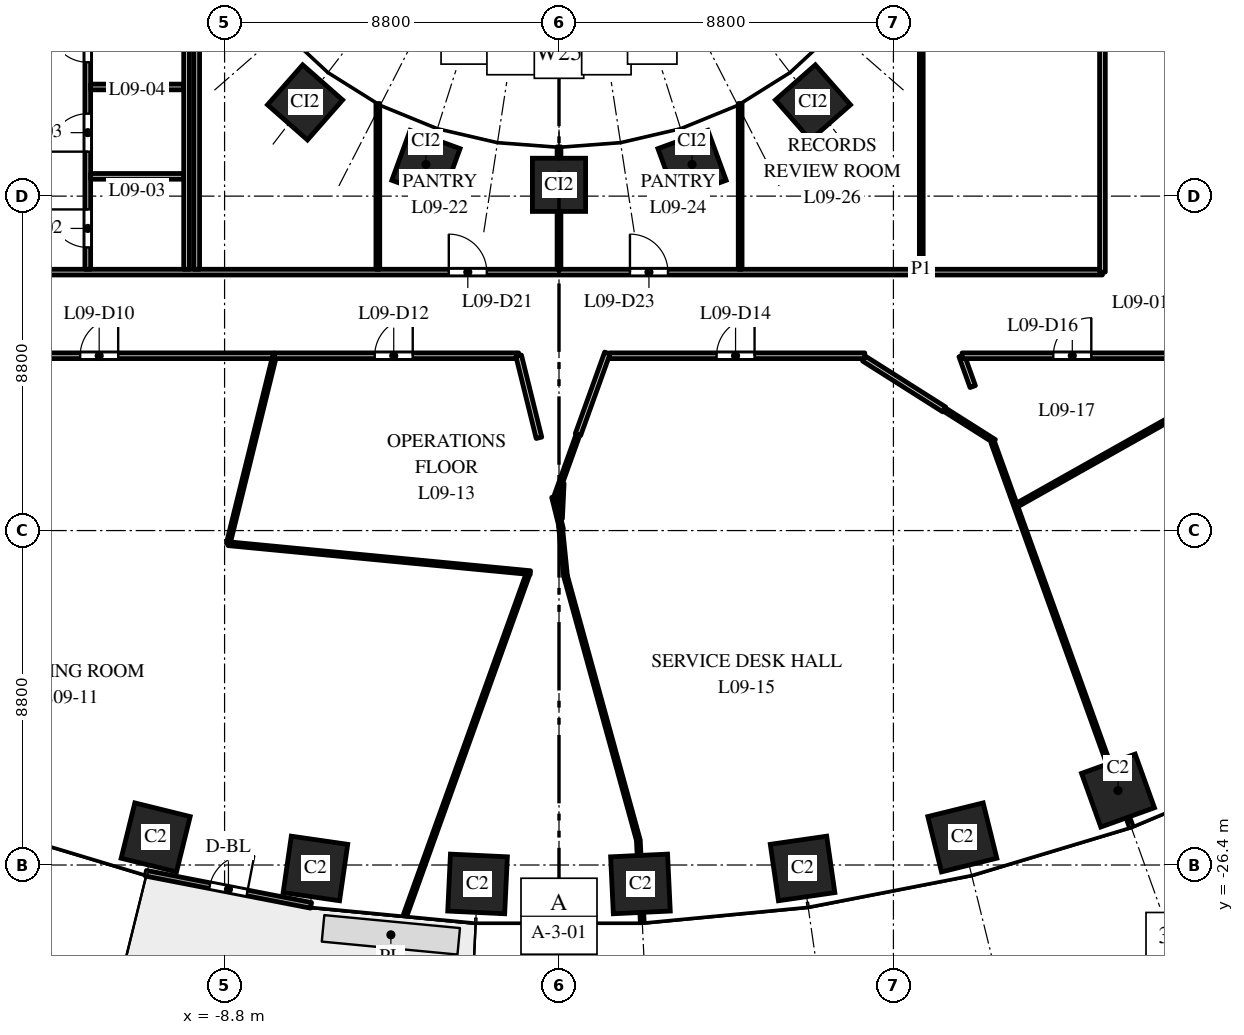
"""IFC4 building model, lengths in metres.
Left out: names, types, materials, properties, quantities, classifications, styles, units other than length and angle.
Written with IfcOpenShell. Run it as: python <this file> out.ifc"""

import sys

from ifc_helpers import new_model, si_unit, direction, frame, frame_2d, origin, origin_2d, place, context, subcontext, project, spatial, rectangle, extrude, element, fill, save


model = new_model("IFC4")
c1 = context("Model", 3, precision=1e-05, world=origin(), true_north=direction((0.0, 1.0)))
c2 = subcontext(c1, "Body", "Model", "MODEL_VIEW")
j1 = project(units=[si_unit("LENGTHUNIT", "METRE"), si_unit("PLANEANGLEUNIT", "RADIAN")], contexts=[c1])
p1 = place(None, origin())
s1 = spatial("IfcSite", under=j1, at=p1, CompositionType="ELEMENT")
p2 = place(p1, origin())
s2 = spatial("IfcBuilding", under=s1, at=p2, CompositionType="ELEMENT")
p3 = place(p2, frame((0.0, 0.0, 46.5)))
s3 = spatial("IfcBuildingStorey", under=s2, at=p3, CompositionType="ELEMENT", Elevation=46.5)
for number, where, z_axis, x_axis in (
    (1, (-10.613, -25.674, 0.0), (0.0, 0.0, 1.0), (0.971, -0.24, 0.0)),
    (2, (-6.409, -26.491, 0.0), (0.0, 0.0, 1.0), (0.99, -0.143, 0.0)),
    (3, (-2.143, -26.898, 0.0), (0.0, 0.0, 1.0), (0.999, -0.048, 0.0)),
    (4, (2.143, -26.898, 0.0), (0.0, 0.0, 1.0), (0.999, 0.048, 0.0)),
    (5, (6.409, -26.491, 0.0), (0.0, 0.0, 1.0), (0.99, 0.143, 0.0)),
    (6, (10.613, -25.674, 0.0), (0.0, 0.0, 1.0), (0.971, 0.24, 0.0)),
    (7, (14.709, -24.441, 0.0), (0.0, 0.0, 1.0), (0.941, 0.338, 0.0)),
):
    element("IfcColumn", number, at=place(p3, frame(where, z_axis=z_axis, x_axis=x_axis)), inside=s3, PredefinedType="COLUMN", context=c2, shape_type="SweptSolid", body=[
        extrude(rectangle(XDim=1.5, YDim=1.5, at=origin_2d()), origin(), (0.0, 0.0, 1.0), 4.0),
    ])
for number, where, z_axis, x_axis in (
    (8, (-6.682, -6.334, 0.0), (0.0, 0.0, 1.0), (0.751, -0.66, 0.0)),
    (9, (-3.501, -7.967, 0.0), (0.0, 0.0, 1.0), (0.939, -0.344, 0.0)),
    (10, (0.0, -8.503, 0.0), (0.0, 0.0, 1.0), (1.0, 0.0, 0.0)),
    (11, (3.501, -7.967, 0.0), (0.0, 0.0, 1.0), (0.939, 0.344, 0.0)),
    (12, (6.682, -6.334, 0.0), (0.0, 0.0, 1.0), (0.751, 0.66, 0.0)),
):
    element("IfcColumn", number, at=place(p3, frame(where, z_axis=z_axis, x_axis=x_axis)), inside=s3, PredefinedType="COLUMN", context=c2, shape_type="SweptSolid", body=[
        extrude(rectangle(XDim=1.4, YDim=1.4, at=origin_2d()), origin(), (0.0, 0.0, 1.0), 4.0),
    ])
p4 = place(p3, frame((-10.871, -26.617, 0.0), z_axis=(0.0, 0.0, 1.0), x_axis=(0.981631174778, -0.190788460615, 0.0)))
e13 = element("IfcWall", 13, at=p4, inside=s3, PredefinedType="STANDARD", context=c2, shape_type="SweptSolid", body=[
    extrude(rectangle(XDim=4.426, YDim=0.15, at=frame_2d((2.213, 0.0))), origin(), (0.0, 0.0, 1.0), 3.7),
])
p5 = place(p4, frame((1.713, 0.0, 0.0)))
e14 = element("IfcOpeningElement", 14, at=p5, cuts=e13, PredefinedType="OPENING", context=c2, shape_type="SweptSolid", body=[
    extrude(rectangle(XDim=1.0, YDim=2.4, at=frame_2d((0.5, 1.2))), frame((0.0, 0.085, 0.0), z_axis=(0.0, -1.0, 0.0), x_axis=(1.0, 0.0, 0.0)), (0.0, 0.0, 1.0), 0.17),
])
p6 = place(p3, frame((-16.5, -13.0, 0.0), z_axis=(0.0, 0.0, 1.0), x_axis=(1.0, 0.0, 0.0)))
e15 = element("IfcWall", 15, at=p6, inside=s3, PredefinedType="PARTITIONING", context=c2, shape_type="SweptSolid", body=[
    extrude(rectangle(XDim=9.001, YDim=0.15, at=frame_2d((4.5, 0.0))), origin(), (0.0, 0.0, 1.0), 2.85),
])
p7 = place(p6, frame((3.9, 0.0, 0.0)))
e16 = element("IfcOpeningElement", 16, at=p7, cuts=e15, PredefinedType="OPENING", context=c2, shape_type="SweptSolid", body=[
    extrude(rectangle(XDim=1.0, YDim=2.1, at=frame_2d((0.5, 1.05))), frame((0.0, 0.085, 0.0), z_axis=(0.0, -1.0, 0.0), x_axis=(1.0, 0.0, 0.0)), (0.0, 0.0, 1.0), 0.17),
])
p8 = place(p3, frame((-14.3, -10.8, 0.0), z_axis=(0.0, 0.0, 1.0), x_axis=(1.0, 0.0, 0.0)))
e17 = element("IfcWall", 17, at=p8, inside=s3, PredefinedType="PARTITIONING", context=c2, shape_type="SweptSolid", body=[
    extrude(rectangle(XDim=28.6, YDim=0.15, at=frame_2d((14.3, 0.0))), origin(), (0.0, 0.0, 1.0), 2.85),
])
p9 = place(p8, frame((11.4, 0.0, 0.0)))
e18 = element("IfcOpeningElement", 18, at=p9, cuts=e17, PredefinedType="OPENING", context=c2, shape_type="SweptSolid", body=[
    extrude(rectangle(XDim=1.0, YDim=2.1, at=frame_2d((0.5, 1.05))), frame((0.0, 0.085, 0.0), z_axis=(0.0, -1.0, 0.0), x_axis=(1.0, 0.0, 0.0)), (0.0, 0.0, 1.0), 0.17),
])
p10 = place(p8, frame((16.167, 0.0, 0.0)))
e19 = element("IfcOpeningElement", 19, at=p10, cuts=e17, PredefinedType="OPENING", context=c2, shape_type="SweptSolid", body=[
    extrude(rectangle(XDim=1.0, YDim=2.1, at=frame_2d((0.5, 1.05))), frame((0.0, 0.085, 0.0), z_axis=(0.0, -1.0, 0.0), x_axis=(1.0, 0.0, 0.0)), (0.0, 0.0, 1.0), 0.17),
])
p11 = place(p3, frame((-12.4, -10.725, 0.0), z_axis=(0.0, 0.0, 1.0), x_axis=(0.0, 1.0, 0.0)))
e20 = element("IfcWall", 20, at=p11, inside=s3, PredefinedType="PARTITIONING", context=c2, shape_type="SweptSolid", body=[
    extrude(rectangle(XDim=7.065, YDim=0.15, at=frame_2d((3.533, 0.0))), origin(), (0.0, 0.0, 1.0), 2.75),
])
p12 = place(p11, frame((0.575, 0.0, 0.0)))
e21 = element("IfcOpeningElement", 21, at=p12, cuts=e20, PredefinedType="OPENING", context=c2, shape_type="SweptSolid", body=[
    extrude(rectangle(XDim=1.0, YDim=2.1, at=frame_2d((0.5, 1.05))), frame((0.0, 0.085, 0.0), z_axis=(0.0, -1.0, 0.0), x_axis=(1.0, 0.0, 0.0)), (0.0, 0.0, 1.0), 0.17),
])
p13 = place(p11, frame((3.095, 0.0, 0.0)))
e22 = element("IfcOpeningElement", 22, at=p13, cuts=e20, PredefinedType="OPENING", context=c2, shape_type="SweptSolid", body=[
    extrude(rectangle(XDim=1.0, YDim=2.1, at=frame_2d((0.5, 1.05))), frame((0.0, 0.085, 0.0), z_axis=(0.0, -1.0, 0.0), x_axis=(1.0, 0.0, 0.0)), (0.0, 0.0, 1.0), 0.17),
])
p14 = place(p11, frame((5.447, 0.0, 0.0)))
e23 = element("IfcOpeningElement", 23, at=p14, cuts=e20, PredefinedType="OPENING", context=c2, shape_type="SweptSolid", body=[
    extrude(rectangle(XDim=1.0, YDim=2.1, at=frame_2d((0.5, 1.05))), frame((0.0, 0.085, 0.0), z_axis=(0.0, -1.0, 0.0), x_axis=(1.0, 0.0, 0.0)), (0.0, 0.0, 1.0), 0.17),
])
p15 = place(p3, frame((-12.325, -8.28, 0.0), z_axis=(0.0, 0.0, 1.0), x_axis=(1.0, 0.0, 0.0)))
e24 = element("IfcWall", 24, at=p15, inside=s3, PredefinedType="PARTITIONING", context=c2, shape_type="SweptSolid", body=[
    extrude(rectangle(XDim=2.45, YDim=0.15, at=frame_2d((1.225, 0.0))), origin(), (0.0, 0.0, 1.0), 2.75),
])
p16 = place(p3, frame((-12.325, -5.928, 0.0), z_axis=(0.0, 0.0, 1.0), x_axis=(1.0, 0.0, 0.0)))
e25 = element("IfcWall", 25, at=p16, inside=s3, PredefinedType="PARTITIONING", context=c2, shape_type="SweptSolid", body=[
    extrude(rectangle(XDim=2.45, YDim=0.15, at=frame_2d((1.225, 0.0))), origin(), (0.0, 0.0, 1.0), 3.7),
])
p17 = place(p3, frame((-9.8, -10.725, 0.0), z_axis=(0.0, 0.0, 1.0), x_axis=(0.0, 1.0, 0.0)))
e26 = element("IfcWall", 26, at=p17, inside=s3, PredefinedType="PARTITIONING", context=c2, shape_type="SweptSolid", body=[
    extrude(rectangle(XDim=7.065, YDim=0.15, at=frame_2d((3.533, 0.0))), origin(), (0.0, 0.0, 1.0), 2.75),
])
p18 = place(p3, frame((-9.533, -10.725, 0.0), z_axis=(0.0, 0.0, 1.0), x_axis=(0.0, 1.0, 0.0)))
e27 = element("IfcWall", 27, at=p18, inside=s3, PredefinedType="PARTITIONING", context=c2, shape_type="SweptSolid", body=[
    extrude(rectangle(XDim=21.45, YDim=0.15, at=frame_2d((10.725, 0.0))), origin(), (0.0, 0.0, 1.0), 2.75),
])
p19 = place(p18, frame((15.575, 0.0, 0.0)))
e28 = element("IfcOpeningElement", 28, at=p19, cuts=e27, PredefinedType="OPENING", context=c2, shape_type="SweptSolid", body=[
    extrude(rectangle(XDim=1.0, YDim=2.1, at=frame_2d((0.5, 1.05))), frame((0.0, 0.085, 0.0), z_axis=(0.0, -1.0, 0.0), x_axis=(1.0, 0.0, 0.0)), (0.0, 0.0, 1.0), 0.17),
])
p20 = place(p3, frame((-8.704, -17.946, 0.0), z_axis=(0.0, 0.0, 1.0), x_axis=(0.239704393154, 0.970845921814, 0.0)))
e29 = element("IfcWall", 29, at=p20, inside=s3, PredefinedType="PARTITIONING", context=c2, shape_type="SweptSolid", body=[
    extrude(rectangle(XDim=5.094, YDim=0.1, at=frame_2d((2.547, 0.0))), origin(), (0.0, 0.0, 1.0), 3.7),
])
p21 = place(p3, frame((-8.704, -17.946, 0.0), z_axis=(0.0, 0.0, 1.0), x_axis=(0.995451268437, -0.095272095422, 0.0)))
e30 = element("IfcWall", 30, at=p21, inside=s3, PredefinedType="PARTITIONING", context=c2, shape_type="SweptSolid", body=[
    extrude(rectangle(XDim=7.988, YDim=0.1, at=frame_2d((3.994, 0.0))), origin(), (0.0, 0.0, 1.0), 2.85),
])
p22 = place(p3, frame((-7.483, -13.0, 0.0), z_axis=(0.0, 0.0, 1.0), x_axis=(1.0, 0.0, 0.0)))
e31 = element("IfcWall", 31, at=p22, inside=s3, PredefinedType="PARTITIONING", context=c2, shape_type="SweptSolid", body=[
    extrude(rectangle(XDim=6.422, YDim=0.15, at=frame_2d((3.211, 0.0))), origin(), (0.0, 0.0, 1.0), 2.85),
])
p23 = place(p22, frame((2.634, 0.0, 0.0)))
e32 = element("IfcOpeningElement", 32, at=p23, cuts=e31, PredefinedType="OPENING", context=c2, shape_type="SweptSolid", body=[
    extrude(rectangle(XDim=1.0, YDim=2.1, at=frame_2d((0.5, 1.05))), frame((0.0, 0.085, 0.0), z_axis=(0.0, -1.0, 0.0), x_axis=(1.0, 0.0, 0.0)), (0.0, 0.0, 1.0), 0.17),
])
p24 = place(p3, frame((-4.767, -10.725, 0.0), z_axis=(0.0, 0.0, 1.0), x_axis=(0.0, 1.0, 0.0)))
e33 = element("IfcWall", 33, at=p24, inside=s3, PredefinedType="PARTITIONING", context=c2, shape_type="SweptSolid", body=[
    extrude(rectangle(XDim=4.362, YDim=0.1, at=frame_2d((2.181, 0.0))), origin(), (0.0, 0.0, 1.0), 2.85),
])
p25 = place(p3, frame((-4.046, -27.717, 0.0), z_axis=(0.0, 0.0, 1.0), x_axis=(0.338447260677, 0.940985362129, 0.0)))
e34 = element("IfcWall", 34, at=p25, inside=s3, PredefinedType="PARTITIONING", context=c2, shape_type="SweptSolid", body=[
    extrude(rectangle(XDim=9.528, YDim=0.1, at=frame_2d((4.764, 0.0))), origin(), (0.0, 0.0, 1.0), 2.85),
])
p26 = place(p3, frame((-1.061, -13.0, 0.0), z_axis=(0.0, 0.0, 1.0), x_axis=(0.240081023427, -0.9707528533, 0.0)))
e35 = element("IfcWall", 35, at=p26, inside=s3, PredefinedType="PARTITIONING", context=c2, shape_type="SweptSolid", body=[
    extrude(rectangle(XDim=2.224, YDim=0.15, at=frame_2d((1.112, 0.0))), origin(), (0.0, 0.0, 1.0), 2.85),
])
p27 = place(p3, frame((-0.143, -16.715, 0.0), z_axis=(0.0, 0.0, 1.0), x_axis=(0.23958475997, -0.970875451739, 0.0)))
e36 = element("IfcWall", 36, at=p27, inside=s3, PredefinedType="PARTITIONING", context=c2, shape_type="SweptSolid", body=[
    extrude(rectangle(XDim=0.876, YDim=0.1, at=frame_2d((0.438, 0.0))), origin(), (0.0, 0.0, 1.0), 3.7),
])
p28 = place(p3, frame((-0.09, -16.718, 0.0), z_axis=(0.0, 0.0, 1.0), x_axis=(0.3382216124, 0.941066491225, 0.0)))
e37 = element("IfcWall", 37, at=p28, inside=s3, PredefinedType="PARTITIONING", context=c2, shape_type="SweptSolid", body=[
    extrude(rectangle(XDim=1.771, YDim=0.1, at=frame_2d((0.886, 0.0))), origin(), (0.0, 0.0, 1.0), 3.7),
])
p29 = place(p3, frame((0.0, -10.725, 0.0), z_axis=(0.0, 0.0, 1.0), x_axis=(0.0, 1.0, 0.0)))
e38 = element("IfcWall", 38, at=p29, inside=s3, PredefinedType="PARTITIONING", context=c2, shape_type="SweptSolid", body=[
    extrude(rectangle(XDim=3.221, YDim=0.1, at=frame_2d((1.611, 0.0))), origin(), (0.0, 0.0, 1.0), 3.7),
])
p30 = place(p3, frame((0.04, -17.284, 0.0), z_axis=(0.0, 0.0, 1.0), x_axis=(0.047302948177, 0.998880589006, 0.0)))
e39 = element("IfcWall", 39, at=p30, inside=s3, PredefinedType="PARTITIONING", context=c2, shape_type="SweptSolid", body=[
    extrude(rectangle(XDim=0.929, YDim=0.1, at=frame_2d((0.464, 0.0))), origin(), (0.0, 0.0, 1.0), 3.7),
])
p31 = place(p3, frame((0.038, -17.474, 0.0), z_axis=(0.0, 0.0, 1.0), x_axis=(0.100886401076, -0.99489795159, 0.0)))
e40 = element("IfcWall", 40, at=p31, inside=s3, PredefinedType="PARTITIONING", context=c2, shape_type="SweptSolid", body=[
    extrude(rectangle(XDim=1.329, YDim=0.1, at=frame_2d((0.664, 0.0))), origin(), (0.0, 0.0, 1.0), 3.7),
])
p32 = place(p3, frame((0.172, -18.796, 0.0), z_axis=(0.0, 0.0, 1.0), x_axis=(0.265628515821, -0.964075459486, 0.0)))
e41 = element("IfcWall", 41, at=p32, inside=s3, PredefinedType="PARTITIONING", context=c2, shape_type="SweptSolid", body=[
    extrude(rectangle(XDim=7.212, YDim=0.1, at=frame_2d((3.606, 0.0))), origin(), (0.0, 0.0, 1.0), 3.7),
])
p33 = place(p3, frame((0.499, -15.075, 0.0), z_axis=(0.0, 0.0, 1.0), x_axis=(0.338871070746, 0.940832821181, 0.0)))
e42 = element("IfcWall", 42, at=p33, inside=s3, PredefinedType="PARTITIONING", context=c2, shape_type="SweptSolid", body=[
    extrude(rectangle(XDim=2.281, YDim=0.15, at=frame_2d((1.141, 0.0))), origin(), (0.0, 0.0, 1.0), 3.7),
])
p34 = place(p3, frame((1.326, -13.0, 0.0), z_axis=(0.0, 0.0, 1.0), x_axis=(1.0, 0.0, 0.0)))
e43 = element("IfcWall", 43, at=p34, inside=s3, PredefinedType="PARTITIONING", context=c2, shape_type="SweptSolid", body=[
    extrude(rectangle(XDim=6.721, YDim=0.15, at=frame_2d((3.361, 0.0))), origin(), (0.0, 0.0, 1.0), 2.85),
])
p35 = place(p34, frame((2.82, 0.0, 0.0)))
e44 = element("IfcOpeningElement", 44, at=p35, cuts=e43, PredefinedType="OPENING", context=c2, shape_type="SweptSolid", body=[
    extrude(rectangle(XDim=1.0, YDim=2.1, at=frame_2d((0.5, 1.05))), frame((0.0, 0.085, 0.0), z_axis=(0.0, -1.0, 0.0), x_axis=(1.0, 0.0, 0.0)), (0.0, 0.0, 1.0), 0.17),
])
p36 = place(p3, frame((2.089, -25.77, 0.0), z_axis=(0.0, 0.0, 1.0), x_axis=(0.04733101585, -0.99887925944, 0.0)))
e45 = element("IfcWall", 45, at=p36, inside=s3, PredefinedType="PARTITIONING", context=c2, shape_type="SweptSolid", body=[
    extrude(rectangle(XDim=2.13, YDim=0.1, at=frame_2d((1.065, 0.0))), origin(), (0.0, 0.0, 1.0), 2.85),
])
p37 = place(p3, frame((4.767, -10.725, 0.0), z_axis=(0.0, 0.0, 1.0), x_axis=(0.0, 1.0, 0.0)))
e46 = element("IfcWall", 46, at=p37, inside=s3, PredefinedType="PARTITIONING", context=c2, shape_type="SweptSolid", body=[
    extrude(rectangle(XDim=4.362, YDim=0.1, at=frame_2d((2.181, 0.0))), origin(), (0.0, 0.0, 1.0), 2.85),
])
p38 = place(p3, frame((8.028, -13.077, 0.0), z_axis=(0.0, 0.0, 1.0), x_axis=(0.844718865656, -0.53521027457, 0.0)))
e47 = element("IfcWall", 47, at=p38, inside=s3, PredefinedType="PARTITIONING", context=c2, shape_type="SweptSolid", body=[
    extrude(rectangle(XDim=2.497, YDim=0.15, at=frame_2d((1.248, 0.0))), origin(), (0.0, 0.0, 1.0), 3.7),
])
p39 = place(p3, frame((9.533, -10.725, 0.0), z_axis=(0.0, 0.0, 1.0), x_axis=(0.0, 1.0, 0.0)))
e48 = element("IfcWall", 48, at=p39, inside=s3, PredefinedType="PARTITIONING", context=c2, shape_type="SweptSolid", body=[
    extrude(rectangle(XDim=21.45, YDim=0.1, at=frame_2d((10.725, 0.0))), origin(), (0.0, 0.0, 1.0), 2.75),
])
p40 = place(p3, frame((10.137, -14.413, 0.0), z_axis=(0.0, 0.0, 1.0), x_axis=(0.844849680057, -0.535003755228, 0.0)))
e49 = element("IfcWall", 49, at=p40, inside=s3, PredefinedType="PARTITIONING", context=c2, shape_type="SweptSolid", body=[
    extrude(rectangle(XDim=1.562, YDim=0.1, at=frame_2d((0.781, 0.0))), origin(), (0.0, 0.0, 1.0), 3.7),
])
p41 = place(p3, frame((10.595, -13.0, 0.0), z_axis=(0.0, 0.0, 1.0), x_axis=(0.338378813476, -0.941009977944, 0.0)))
e50 = element("IfcWall", 50, at=p41, inside=s3, PredefinedType="PARTITIONING", context=c2, shape_type="SweptSolid", body=[
    extrude(rectangle(XDim=0.863, YDim=0.15, at=frame_2d((0.432, 0.0))), origin(), (0.0, 0.0, 1.0), 3.7),
])
p42 = place(p3, frame((10.607, -13.0, 0.0), z_axis=(0.0, 0.0, 1.0), x_axis=(1.0, 0.0, 0.0)))
e51 = element("IfcWall", 51, at=p42, inside=s3, PredefinedType="PARTITIONING", context=c2, shape_type="SweptSolid", body=[
    extrude(rectangle(XDim=5.893, YDim=0.15, at=frame_2d((2.947, 0.0))), origin(), (0.0, 0.0, 1.0), 3.7),
])
p43 = place(p42, frame((2.4, 0.0, 0.0)))
e52 = element("IfcOpeningElement", 52, at=p43, cuts=e51, PredefinedType="OPENING", context=c2, shape_type="SweptSolid", body=[
    extrude(rectangle(XDim=1.0, YDim=2.1, at=frame_2d((0.5, 1.05))), frame((0.0, 0.085, 0.0), z_axis=(0.0, -1.0, 0.0), x_axis=(1.0, 0.0, 0.0)), (0.0, 0.0, 1.0), 0.17),
])
p44 = place(p3, frame((11.416, -15.282, 0.0), z_axis=(0.0, 0.0, 1.0), x_axis=(0.338824973611, -0.940849423265, 0.0)))
e53 = element("IfcWall", 53, at=p44, inside=s3, PredefinedType="PARTITIONING", context=c2, shape_type="SweptSolid", body=[
    extrude(rectangle(XDim=10.734, YDim=0.1, at=frame_2d((5.367, 0.0))), origin(), (0.0, 0.0, 1.0), 3.7),
])
p45 = place(p3, frame((12.06, -16.924, 0.0), z_axis=(0.0, 0.0, 1.0), x_axis=(0.871521837039, 0.490356694218, 0.0)))
e54 = element("IfcWall", 54, at=p45, inside=s3, PredefinedType="PARTITIONING", context=c2, shape_type="SweptSolid", body=[
    extrude(rectangle(XDim=9.836, YDim=0.1, at=frame_2d((4.918, 0.0))), origin(), (0.0, 0.0, 1.0), 3.7),
])
p46 = place(p3, frame((14.3, -10.8, 0.0), z_axis=(0.0, 0.0, 1.0), x_axis=(0.0, 1.0, 0.0)))
e55 = element("IfcWall", 55, at=p46, inside=s3, PredefinedType="PARTITIONING", context=c2, shape_type="SweptSolid", body=[
    extrude(rectangle(XDim=21.6, YDim=0.15, at=frame_2d((10.8, 0.0))), origin(), (0.0, 0.0, 1.0), 2.75),
])
p47 = place(p46, frame((10.2, 0.0, 0.0)))
e56 = element("IfcOpeningElement", 56, at=p47, cuts=e55, PredefinedType="OPENING", context=c2, shape_type="SweptSolid", body=[
    extrude(rectangle(XDim=1.0, YDim=2.1, at=frame_2d((0.5, 1.05))), frame((0.0, 0.085, 0.0), z_axis=(0.0, -1.0, 0.0), x_axis=(1.0, 0.0, 0.0)), (0.0, 0.0, 1.0), 0.17),
])
p48 = place(p5, origin())
e57 = element("IfcDoor", 57, at=p48, inside=s3, OperationType="SINGLE_SWING_RIGHT", PredefinedType="DOOR", context=c2, shape_type="SweptSolid", body=[
    extrude(rectangle(XDim=1.0, YDim=2.4, at=frame_2d((0.5, 1.2))), frame((0.0, 0.025, 0.0), z_axis=(0.0, -1.0, 0.0), x_axis=(1.0, 0.0, 0.0)), (0.0, 0.0, 1.0), 0.05),
])
fill(e14, e57)
p49 = place(p12, origin())
e58 = element("IfcDoor", 58, at=p49, inside=s3, OperationType="SINGLE_SWING_RIGHT", PredefinedType="DOOR", context=c2, shape_type="SweptSolid", body=[
    extrude(rectangle(XDim=1.0, YDim=2.1, at=frame_2d((0.5, 1.05))), frame((0.0, 0.025, 0.0), z_axis=(0.0, -1.0, 0.0), x_axis=(1.0, 0.0, 0.0)), (0.0, 0.0, 1.0), 0.05),
])
fill(e21, e58)
p50 = place(p13, origin())
e59 = element("IfcDoor", 59, at=p50, inside=s3, OperationType="SINGLE_SWING_LEFT", PredefinedType="DOOR", context=c2, shape_type="SweptSolid", body=[
    extrude(rectangle(XDim=1.0, YDim=2.1, at=frame_2d((0.5, 1.05))), frame((0.0, 0.025, 0.0), z_axis=(0.0, -1.0, 0.0), x_axis=(1.0, 0.0, 0.0)), (0.0, 0.0, 1.0), 0.05),
])
fill(e22, e59)
p51 = place(p14, origin())
e60 = element("IfcDoor", 60, at=p51, inside=s3, OperationType="SINGLE_SWING_RIGHT", PredefinedType="DOOR", context=c2, shape_type="SweptSolid", body=[
    extrude(rectangle(XDim=1.0, YDim=2.1, at=frame_2d((0.5, 1.05))), frame((0.0, 0.025, 0.0), z_axis=(0.0, -1.0, 0.0), x_axis=(1.0, 0.0, 0.0)), (0.0, 0.0, 1.0), 0.05),
])
fill(e23, e60)
p52 = place(p7, origin())
e61 = element("IfcDoor", 61, at=p52, inside=s3, OperationType="SINGLE_SWING_RIGHT", PredefinedType="DOOR", context=c2, shape_type="SweptSolid", body=[
    extrude(rectangle(XDim=1.0, YDim=2.1, at=frame_2d((0.5, 1.05))), frame((0.0, 0.025, 0.0), z_axis=(0.0, -1.0, 0.0), x_axis=(1.0, 0.0, 0.0)), (0.0, 0.0, 1.0), 0.05),
])
fill(e16, e61)
p53 = place(p23, origin())
e62 = element("IfcDoor", 62, at=p53, inside=s3, OperationType="SINGLE_SWING_RIGHT", PredefinedType="DOOR", context=c2, shape_type="SweptSolid", body=[
    extrude(rectangle(XDim=1.0, YDim=2.1, at=frame_2d((0.5, 1.05))), frame((0.0, 0.025, 0.0), z_axis=(0.0, -1.0, 0.0), x_axis=(1.0, 0.0, 0.0)), (0.0, 0.0, 1.0), 0.05),
])
fill(e32, e62)
p54 = place(p35, origin())
e63 = element("IfcDoor", 63, at=p54, inside=s3, OperationType="SINGLE_SWING_RIGHT", PredefinedType="DOOR", context=c2, shape_type="SweptSolid", body=[
    extrude(rectangle(XDim=1.0, YDim=2.1, at=frame_2d((0.5, 1.05))), frame((0.0, 0.025, 0.0), z_axis=(0.0, -1.0, 0.0), x_axis=(1.0, 0.0, 0.0)), (0.0, 0.0, 1.0), 0.05),
])
fill(e44, e63)
p55 = place(p43, origin())
e64 = element("IfcDoor", 64, at=p55, inside=s3, OperationType="SINGLE_SWING_RIGHT", PredefinedType="DOOR", context=c2, shape_type="SweptSolid", body=[
    extrude(rectangle(XDim=1.0, YDim=2.1, at=frame_2d((0.5, 1.05))), frame((0.0, 0.025, 0.0), z_axis=(0.0, -1.0, 0.0), x_axis=(1.0, 0.0, 0.0)), (0.0, 0.0, 1.0), 0.05),
])
fill(e52, e64)
p56 = place(p9, origin())
e65 = element("IfcDoor", 65, at=p56, inside=s3, OperationType="SINGLE_SWING_LEFT", PredefinedType="DOOR", context=c2, shape_type="SweptSolid", body=[
    extrude(rectangle(XDim=1.0, YDim=2.1, at=frame_2d((0.5, 1.05))), frame((0.0, 0.025, 0.0), z_axis=(0.0, -1.0, 0.0), x_axis=(1.0, 0.0, 0.0)), (0.0, 0.0, 1.0), 0.05),
])
fill(e18, e65)
p57 = place(p10, origin())
e66 = element("IfcDoor", 66, at=p57, inside=s3, OperationType="SINGLE_SWING_LEFT", PredefinedType="DOOR", context=c2, shape_type="SweptSolid", body=[
    extrude(rectangle(XDim=1.0, YDim=2.1, at=frame_2d((0.5, 1.05))), frame((0.0, 0.025, 0.0), z_axis=(0.0, -1.0, 0.0), x_axis=(1.0, 0.0, 0.0)), (0.0, 0.0, 1.0), 0.05),
])
fill(e19, e66)
save(model, sys.argv[1])
